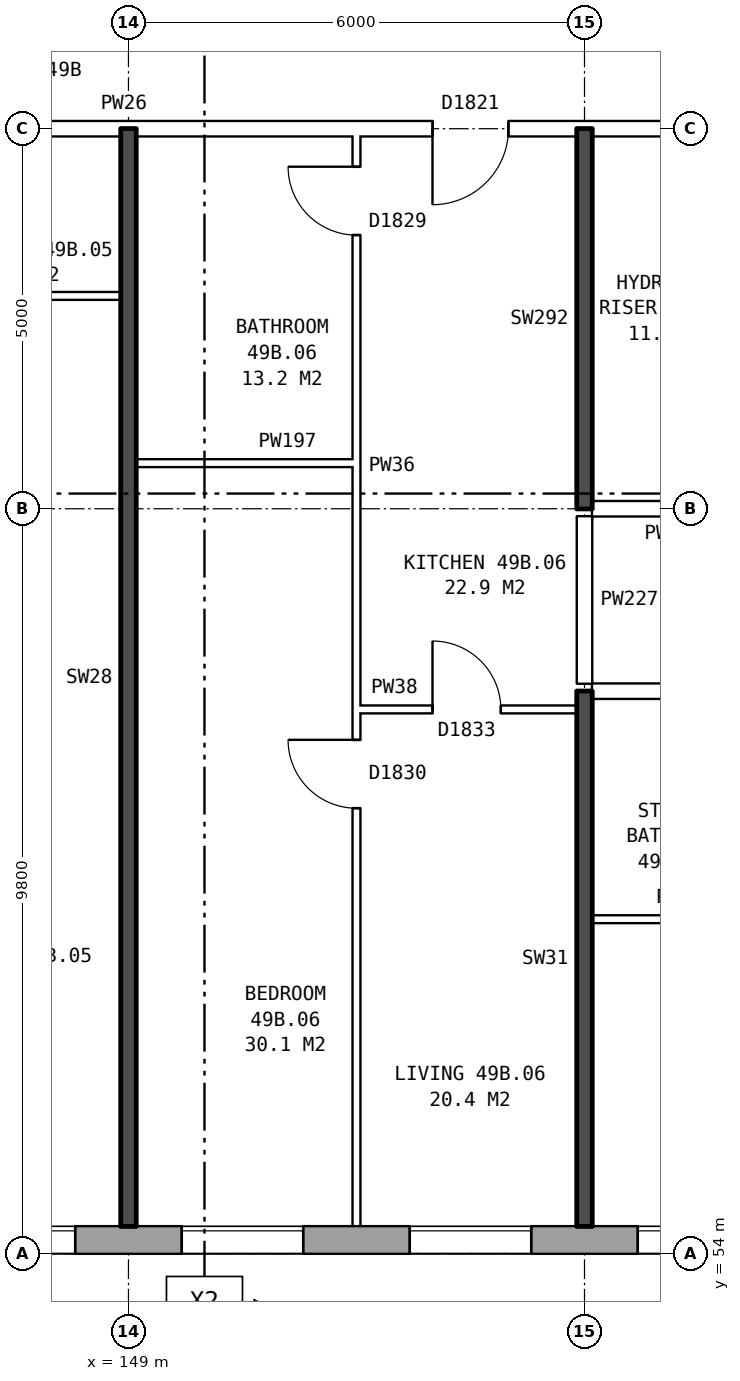
"""IFC4 building model, lengths in metres.
Left out: names, types, materials, properties, quantities, classifications, styles, units other than length and angle.
Written with IfcOpenShell. Run it as: python <this file> out.ifc"""

import sys

from ifc_helpers import new_model, si_unit, direction, frame, frame_2d, origin, place, context, subcontext, project, spatial, rectangle, extrude, element, fill, save


model = new_model("IFC4")
c1 = context("Model", 3, precision=1e-05, world=origin(), true_north=direction((0.0, 1.0)))
c2 = subcontext(c1, "Body", "Model", "MODEL_VIEW")
j1 = project(units=[si_unit("LENGTHUNIT", "METRE"), si_unit("PLANEANGLEUNIT", "RADIAN")], contexts=[c1])
p1 = place(None, origin())
s1 = spatial("IfcSite", under=j1, at=p1, CompositionType="ELEMENT")
p2 = place(p1, origin())
s2 = spatial("IfcBuilding", under=s1, at=p2, CompositionType="ELEMENT")
p3 = place(p2, frame((0.0, 0.0, 175.8)))
s3 = spatial("IfcBuildingStorey", under=s2, at=p3, CompositionType="ELEMENT", Elevation=175.8)
p4 = place(p3, frame((134.075, 54.18, 0.0), z_axis=(0.0, 0.0, 1.0), x_axis=(1.0, 0.0, 0.0)))
e1 = element("IfcWall", 1, at=p4, inside=s3, PredefinedType="STANDARD", context=c2, shape_type="SweptSolid", body=[
    extrude(rectangle(XDim=33.101, YDim=0.36, at=frame_2d((16.55, 0.0))), origin(), (0.0, 0.0, 1.0), 2.85),
])
p5 = place(p4, frame((0.3, 0.0, 0.8)))
e2 = element("IfcOpeningElement", 2, at=p5, cuts=e1, PredefinedType="OPENING", context=c2, shape_type="SweptSolid", body=[
    extrude(rectangle(XDim=0.6, YDim=1.8, at=frame_2d((0.3, 0.9))), frame((0.0, 0.19, 0.0), z_axis=(0.0, -1.0, 0.0), x_axis=(1.0, 0.0, 0.0)), (0.0, 0.0, 1.0), 0.38),
])
p6 = place(p4, frame((3.625, 0.0, 0.8)))
e3 = element("IfcOpeningElement", 3, at=p6, cuts=e1, PredefinedType="OPENING", context=c2, shape_type="SweptSolid", body=[
    extrude(rectangle(XDim=1.6, YDim=1.8, at=frame_2d((0.8, 0.9))), frame((0.0, 0.19, 0.0), z_axis=(0.0, -1.0, 0.0), x_axis=(1.0, 0.0, 0.0)), (0.0, 0.0, 1.0), 0.38),
])
p7 = place(p4, frame((6.625, 0.0, 0.8)))
e4 = element("IfcOpeningElement", 4, at=p7, cuts=e1, PredefinedType="OPENING", context=c2, shape_type="SweptSolid", body=[
    extrude(rectangle(XDim=1.6, YDim=1.8, at=frame_2d((0.8, 0.9))), frame((0.0, 0.19, 0.0), z_axis=(0.0, -1.0, 0.0), x_axis=(1.0, 0.0, 0.0)), (0.0, 0.0, 1.0), 0.38),
])
p8 = place(p4, frame((9.625, 0.0, 0.8)))
e5 = element("IfcOpeningElement", 5, at=p8, cuts=e1, PredefinedType="OPENING", context=c2, shape_type="SweptSolid", body=[
    extrude(rectangle(XDim=1.6, YDim=1.8, at=frame_2d((0.8, 0.9))), frame((0.0, 0.19, 0.0), z_axis=(0.0, -1.0, 0.0), x_axis=(1.0, 0.0, 0.0)), (0.0, 0.0, 1.0), 0.38),
])
p9 = place(p4, frame((12.625, 0.0, 0.8)))
e6 = element("IfcOpeningElement", 6, at=p9, cuts=e1, PredefinedType="OPENING", context=c2, shape_type="SweptSolid", body=[
    extrude(rectangle(XDim=1.6, YDim=1.8, at=frame_2d((0.8, 0.9))), frame((0.0, 0.19, 0.0), z_axis=(0.0, -1.0, 0.0), x_axis=(1.0, 0.0, 0.0)), (0.0, 0.0, 1.0), 0.38),
])
p10 = place(p4, frame((15.625, 0.0, 0.8)))
e7 = element("IfcOpeningElement", 7, at=p10, cuts=e1, PredefinedType="OPENING", context=c2, shape_type="SweptSolid", body=[
    extrude(rectangle(XDim=1.6, YDim=1.8, at=frame_2d((0.8, 0.9))), frame((0.0, 0.19, 0.0), z_axis=(0.0, -1.0, 0.0), x_axis=(1.0, 0.0, 0.0)), (0.0, 0.0, 1.0), 0.38),
])
p11 = place(p4, frame((18.625, 0.0, 0.8)))
e8 = element("IfcOpeningElement", 8, at=p11, cuts=e1, PredefinedType="OPENING", context=c2, shape_type="SweptSolid", body=[
    extrude(rectangle(XDim=1.6, YDim=1.8, at=frame_2d((0.8, 0.9))), frame((0.0, 0.19, 0.0), z_axis=(0.0, -1.0, 0.0), x_axis=(1.0, 0.0, 0.0)), (0.0, 0.0, 1.0), 0.38),
])
p12 = place(p4, frame((21.625, 0.0, 0.8)))
e9 = element("IfcOpeningElement", 9, at=p12, cuts=e1, PredefinedType="OPENING", context=c2, shape_type="SweptSolid", body=[
    extrude(rectangle(XDim=1.6, YDim=1.8, at=frame_2d((0.8, 0.9))), frame((0.0, 0.19, 0.0), z_axis=(0.0, -1.0, 0.0), x_axis=(1.0, 0.0, 0.0)), (0.0, 0.0, 1.0), 0.38),
])
p13 = place(p4, frame((24.625, 0.0, 0.8)))
e10 = element("IfcOpeningElement", 10, at=p13, cuts=e1, PredefinedType="OPENING", context=c2, shape_type="SweptSolid", body=[
    extrude(rectangle(XDim=1.6, YDim=1.8, at=frame_2d((0.8, 0.9))), frame((0.0, 0.19, 0.0), z_axis=(0.0, -1.0, 0.0), x_axis=(1.0, 0.0, 0.0)), (0.0, 0.0, 1.0), 0.38),
])
p14 = place(p4, frame((27.625, 0.0, 0.8)))
e11 = element("IfcOpeningElement", 11, at=p14, cuts=e1, PredefinedType="OPENING", context=c2, shape_type="SweptSolid", body=[
    extrude(rectangle(XDim=1.6, YDim=1.8, at=frame_2d((0.8, 0.9))), frame((0.0, 0.19, 0.0), z_axis=(0.0, -1.0, 0.0), x_axis=(1.0, 0.0, 0.0)), (0.0, 0.0, 1.0), 0.38),
])
p15 = place(p4, frame((29.525, 0.0, 0.8)))
e12 = element("IfcOpeningElement", 12, at=p15, cuts=e1, PredefinedType="OPENING", context=c2, shape_type="SweptSolid", body=[
    extrude(rectangle(XDim=0.6, YDim=0.9, at=frame_2d((0.3, 0.45))), frame((0.0, 0.19, 0.0), z_axis=(0.0, -1.0, 0.0), x_axis=(1.0, 0.0, 0.0)), (0.0, 0.0, 1.0), 0.38),
])
p16 = place(p4, frame((1.2, 0.0, 1.7)))
e13 = element("IfcOpeningElement", 13, at=p16, cuts=e1, PredefinedType="OPENING", context=c2, shape_type="SweptSolid", body=[
    extrude(rectangle(XDim=0.6, YDim=0.9, at=frame_2d((0.3, 0.45))), frame((0.0, 0.19, 0.0), z_axis=(0.0, -1.0, 0.0), x_axis=(1.0, 0.0, 0.0)), (0.0, 0.0, 1.0), 0.38),
])
p17 = place(p4, frame((31.575, 0.0, 1.4)))
e14 = element("IfcOpeningElement", 14, at=p17, cuts=e1, PredefinedType="OPENING", context=c2, shape_type="SweptSolid", body=[
    extrude(rectangle(XDim=1.2, YDim=1.2, at=frame_2d((0.6, 0.6))), frame((0.0, 0.19, 0.0), z_axis=(0.0, -1.0, 0.0), x_axis=(1.0, 0.0, 0.0)), (0.0, 0.0, 1.0), 0.38),
])
p18 = place(p3, frame((155.1, 58.4, 0.0), z_axis=(0.0, 0.0, 1.0), x_axis=(1.0, 0.0, 0.0)))
e15 = element("IfcWall", 15, at=p18, inside=s3, PredefinedType="PARTITIONING", context=c2, shape_type="SweptSolid", body=[
    extrude(rectangle(XDim=2.3, YDim=0.1, at=frame_2d((1.15, 0.0))), origin(), (0.0, 0.0, 1.0), 2.85),
])
p19 = place(p3, frame((152.0, 61.16, 0.0), z_axis=(0.0, 0.0, 1.0), x_axis=(1.0, 0.0, 0.0)))
e16 = element("IfcWall", 16, at=p19, inside=s3, PredefinedType="PARTITIONING", context=c2, shape_type="SweptSolid", body=[
    extrude(rectangle(XDim=2.9, YDim=0.1, at=frame_2d((1.45, 0.0))), origin(), (0.0, 0.0, 1.0), 2.85),
])
p20 = place(p19, frame((1.0, 0.0, 0.0)))
e17 = element("IfcOpeningElement", 17, at=p20, cuts=e16, PredefinedType="OPENING", context=c2, shape_type="SweptSolid", body=[
    extrude(rectangle(XDim=0.9, YDim=2.1, at=frame_2d((0.45, 1.05))), frame((0.0, 0.06, 0.0), z_axis=(0.0, -1.0, 0.0), x_axis=(1.0, 0.0, 0.0)), (0.0, 0.0, 1.0), 0.12),
])
p21 = place(p3, frame((155.1, 61.4, 0.0), z_axis=(0.0, 0.0, 1.0), x_axis=(1.0, 0.0, 0.0)))
e18 = element("IfcWall", 18, at=p21, inside=s3, PredefinedType="PARTITIONING", context=c2, shape_type="SweptSolid", body=[
    extrude(rectangle(XDim=14.79, YDim=0.2, at=frame_2d((7.395, 0.0))), origin(), (0.0, 0.0, 1.0), 2.85),
])
p22 = place(p21, frame((3.6, 0.0, 0.0)))
e19 = element("IfcOpeningElement", 19, at=p22, cuts=e18, PredefinedType="OPENING", context=c2, shape_type="SweptSolid", body=[
    extrude(rectangle(XDim=1.0, YDim=2.1, at=frame_2d((0.5, 1.05))), frame((0.0, 0.11, 0.0), z_axis=(0.0, -1.0, 0.0), x_axis=(1.0, 0.0, 0.0)), (0.0, 0.0, 1.0), 0.22),
])
p23 = place(p21, frame((11.045, 0.0, 0.0)))
e20 = element("IfcOpeningElement", 20, at=p23, cuts=e18, PredefinedType="OPENING", context=c2, shape_type="SweptSolid", body=[
    extrude(rectangle(XDim=1.0, YDim=2.1, at=frame_2d((0.5, 1.05))), frame((0.0, 0.11, 0.0), z_axis=(0.0, -1.0, 0.0), x_axis=(1.0, 0.0, 0.0)), (0.0, 0.0, 1.0), 0.22),
])
p24 = place(p3, frame((155.1, 63.8, 0.0), z_axis=(0.0, 0.0, 1.0), x_axis=(1.0, 0.0, 0.0)))
e21 = element("IfcWall", 21, at=p24, inside=s3, PredefinedType="PARTITIONING", context=c2, shape_type="SweptSolid", body=[
    extrude(rectangle(XDim=2.14, YDim=0.2, at=frame_2d((1.07, 0.0))), origin(), (0.0, 0.0, 1.0), 2.85),
])
for number, where, z_axis, x_axis in (
    (22, (149.1, 64.4, 0.0), (0.0, 0.0, 1.0), (1.0, 0.0, 0.0)),
    (23, (146.0, 66.6, 0.0), (0.0, 0.0, 1.0), (1.0, 0.0, 0.0)),
):
    element("IfcWall", number, at=place(p3, frame(where, z_axis=z_axis, x_axis=x_axis)), inside=s3, PredefinedType="PARTITIONING", context=c2, shape_type="SweptSolid", body=[
        extrude(rectangle(XDim=2.9, YDim=0.1, at=frame_2d((1.45, 0.0))), origin(), (0.0, 0.0, 1.0), 2.85),
    ])
p25 = place(p3, frame((142.76, 68.8, 0.0), z_axis=(0.0, 0.0, 1.0), x_axis=(1.0, 0.0, 0.0)))
e24 = element("IfcWall", 24, at=p25, inside=s3, PredefinedType="PARTITIONING", context=c2, shape_type="SweptSolid", body=[
    extrude(rectangle(XDim=14.48, YDim=0.2, at=frame_2d((7.24, 0.0))), origin(), (0.0, 0.0, 1.0), 2.85),
])
p26 = place(p25, frame((1.12, 0.0, 0.0)))
e25 = element("IfcOpeningElement", 25, at=p26, cuts=e24, PredefinedType="OPENING", context=c2, shape_type="SweptSolid", body=[
    extrude(rectangle(XDim=1.0, YDim=2.1, at=frame_2d((0.5, 1.05))), frame((0.0, 0.11, 0.0), z_axis=(0.0, -1.0, 0.0), x_axis=(1.0, 0.0, 0.0)), (0.0, 0.0, 1.0), 0.22),
])
p27 = place(p25, frame((10.24, 0.0, 0.0)))
e26 = element("IfcOpeningElement", 26, at=p27, cuts=e24, PredefinedType="OPENING", context=c2, shape_type="SweptSolid", body=[
    extrude(rectangle(XDim=1.0, YDim=2.1, at=frame_2d((0.5, 1.05))), frame((0.0, 0.11, 0.0), z_axis=(0.0, -1.0, 0.0), x_axis=(1.0, 0.0, 0.0)), (0.0, 0.0, 1.0), 0.22),
])
p28 = place(p3, frame((149.0, 54.36, 0.0), z_axis=(0.0, 0.0, 1.0), x_axis=(0.0, 1.0, 0.0)))
e27 = element("IfcWall", 27, at=p28, inside=s3, PredefinedType="SOLIDWALL", context=c2, shape_type="SweptSolid", body=[
    extrude(rectangle(XDim=14.44, YDim=0.2, at=frame_2d((7.22, 0.0))), origin(), (0.0, 0.0, 1.0), 2.85),
])
p29 = place(p3, frame((152.0, 54.36, 0.0), z_axis=(0.0, 0.0, 1.0), x_axis=(0.0, 1.0, 0.0)))
e28 = element("IfcWall", 28, at=p29, inside=s3, PredefinedType="PARTITIONING", context=c2, shape_type="SweptSolid", body=[
    extrude(rectangle(XDim=14.34, YDim=0.1, at=frame_2d((7.17, 0.0))), origin(), (0.0, 0.0, 1.0), 2.85),
])
p30 = place(p29, frame((5.5, 0.0, 0.0)))
e29 = element("IfcOpeningElement", 29, at=p30, cuts=e28, PredefinedType="OPENING", context=c2, shape_type="SweptSolid", body=[
    extrude(rectangle(XDim=0.9, YDim=2.1, at=frame_2d((0.45, 1.05))), frame((0.0, 0.06, 0.0), z_axis=(0.0, -1.0, 0.0), x_axis=(1.0, 0.0, 0.0)), (0.0, 0.0, 1.0), 0.12),
])
p31 = place(p29, frame((13.04, 0.0, 0.0)))
e30 = element("IfcOpeningElement", 30, at=p31, cuts=e28, PredefinedType="OPENING", context=c2, shape_type="SweptSolid", body=[
    extrude(rectangle(XDim=0.9, YDim=2.1, at=frame_2d((0.45, 1.05))), frame((0.0, 0.06, 0.0), z_axis=(0.0, -1.0, 0.0), x_axis=(1.0, 0.0, 0.0)), (0.0, 0.0, 1.0), 0.12),
])
p32 = place(p3, frame((155.0, 54.36, 0.0), z_axis=(0.0, 0.0, 1.0), x_axis=(0.0, 1.0, 0.0)))
e31 = element("IfcWall", 31, at=p32, inside=s3, PredefinedType="SOLIDWALL", context=c2, shape_type="SweptSolid", body=[
    extrude(rectangle(XDim=7.04, YDim=0.2, at=frame_2d((3.52, 0.0))), origin(), (0.0, 0.0, 1.0), 2.85),
])
p33 = place(p3, frame((155.0, 61.5, 0.0), z_axis=(0.0, 0.0, 1.0), x_axis=(0.0, 1.0, 0.0)))
e32 = element("IfcWall", 32, at=p33, inside=s3, PredefinedType="PARTITIONING", context=c2, shape_type="SweptSolid", body=[
    extrude(rectangle(XDim=2.2, YDim=0.2, at=frame_2d((1.1, 0.0))), origin(), (0.0, 0.0, 1.0), 2.85),
])
p34 = place(p3, frame((155.0, 63.8, 0.0), z_axis=(0.0, 0.0, 1.0), x_axis=(0.0, 1.0, 0.0)))
e33 = element("IfcWall", 33, at=p34, inside=s3, PredefinedType="SOLIDWALL", context=c2, shape_type="SweptSolid", body=[
    extrude(rectangle(XDim=5.0, YDim=0.2, at=frame_2d((2.5, 0.0))), origin(), (0.0, 0.0, 1.0), 2.85),
])
p35 = place(p9, origin())
e34 = element("IfcWindow", 34, at=p35, inside=s3, PartitioningType="SINGLE_PANEL", PredefinedType="WINDOW", context=c2, shape_type="SweptSolid", body=[
    extrude(rectangle(XDim=1.6, YDim=1.8, at=frame_2d((0.8, 0.9))), frame((0.0, 0.15, 0.0), z_axis=(0.0, -1.0, 0.0), x_axis=(1.0, 0.0, 0.0)), (0.0, 0.0, 1.0), 0.06),
])
fill(e6, e34)
p36 = place(p10, origin())
e35 = element("IfcWindow", 35, at=p36, inside=s3, PartitioningType="SINGLE_PANEL", PredefinedType="WINDOW", context=c2, shape_type="SweptSolid", body=[
    extrude(rectangle(XDim=1.6, YDim=1.8, at=frame_2d((0.8, 0.9))), frame((0.0, 0.15, 0.0), z_axis=(0.0, -1.0, 0.0), x_axis=(1.0, 0.0, 0.0)), (0.0, 0.0, 1.0), 0.06),
])
fill(e7, e35)
p37 = place(p11, origin())
e36 = element("IfcWindow", 36, at=p37, inside=s3, PartitioningType="SINGLE_PANEL", PredefinedType="WINDOW", context=c2, shape_type="SweptSolid", body=[
    extrude(rectangle(XDim=1.6, YDim=1.8, at=frame_2d((0.8, 0.9))), frame((0.0, 0.15, 0.0), z_axis=(0.0, -1.0, 0.0), x_axis=(1.0, 0.0, 0.0)), (0.0, 0.0, 1.0), 0.06),
])
fill(e8, e36)
p38 = place(p12, origin())
e37 = element("IfcWindow", 37, at=p38, inside=s3, PartitioningType="SINGLE_PANEL", PredefinedType="WINDOW", context=c2, shape_type="SweptSolid", body=[
    extrude(rectangle(XDim=1.6, YDim=1.8, at=frame_2d((0.8, 0.9))), frame((0.0, 0.15, 0.0), z_axis=(0.0, -1.0, 0.0), x_axis=(1.0, 0.0, 0.0)), (0.0, 0.0, 1.0), 0.06),
])
fill(e9, e37)
p39 = place(p30, origin())
e38 = element("IfcDoor", 38, at=p39, inside=s3, OperationType="SINGLE_SWING_RIGHT", PredefinedType="DOOR", context=c2, shape_type="SweptSolid", body=[
    extrude(rectangle(XDim=0.9, YDim=2.1, at=frame_2d((0.45, 1.05))), frame((0.0, 0.025, 0.0), z_axis=(0.0, -1.0, 0.0), x_axis=(1.0, 0.0, 0.0)), (0.0, 0.0, 1.0), 0.05),
])
fill(e29, e38)
p40 = place(p27, frame((1.0, 0.0, 0.0), z_axis=(0.0, 0.0, 1.0), x_axis=(-1.0, 0.0, 0.0)))
e39 = element("IfcDoor", 39, at=p40, inside=s3, OperationType="SINGLE_SWING_RIGHT", PredefinedType="DOOR", context=c2, shape_type="SweptSolid", body=[
    extrude(rectangle(XDim=1.0, YDim=2.1, at=frame_2d((0.5, 1.05))), frame((0.0, 0.025, 0.0), z_axis=(0.0, -1.0, 0.0), x_axis=(1.0, 0.0, 0.0)), (0.0, 0.0, 1.0), 0.05),
])
fill(e26, e39)
p41 = place(p20, origin())
e40 = element("IfcDoor", 40, at=p41, inside=s3, OperationType="SINGLE_SWING_LEFT", PredefinedType="DOOR", context=c2, shape_type="SweptSolid", body=[
    extrude(rectangle(XDim=0.9, YDim=2.1, at=frame_2d((0.45, 1.05))), frame((0.0, 0.025, 0.0), z_axis=(0.0, -1.0, 0.0), x_axis=(1.0, 0.0, 0.0)), (0.0, 0.0, 1.0), 0.05),
])
fill(e17, e40)
p42 = place(p31, origin())
e41 = element("IfcDoor", 41, at=p42, inside=s3, OperationType="SINGLE_SWING_RIGHT", PredefinedType="DOOR", context=c2, shape_type="SweptSolid", body=[
    extrude(rectangle(XDim=0.9, YDim=2.1, at=frame_2d((0.45, 1.05))), frame((0.0, 0.025, 0.0), z_axis=(0.0, -1.0, 0.0), x_axis=(1.0, 0.0, 0.0)), (0.0, 0.0, 1.0), 0.05),
])
fill(e30, e41)
save(model, sys.argv[1])
